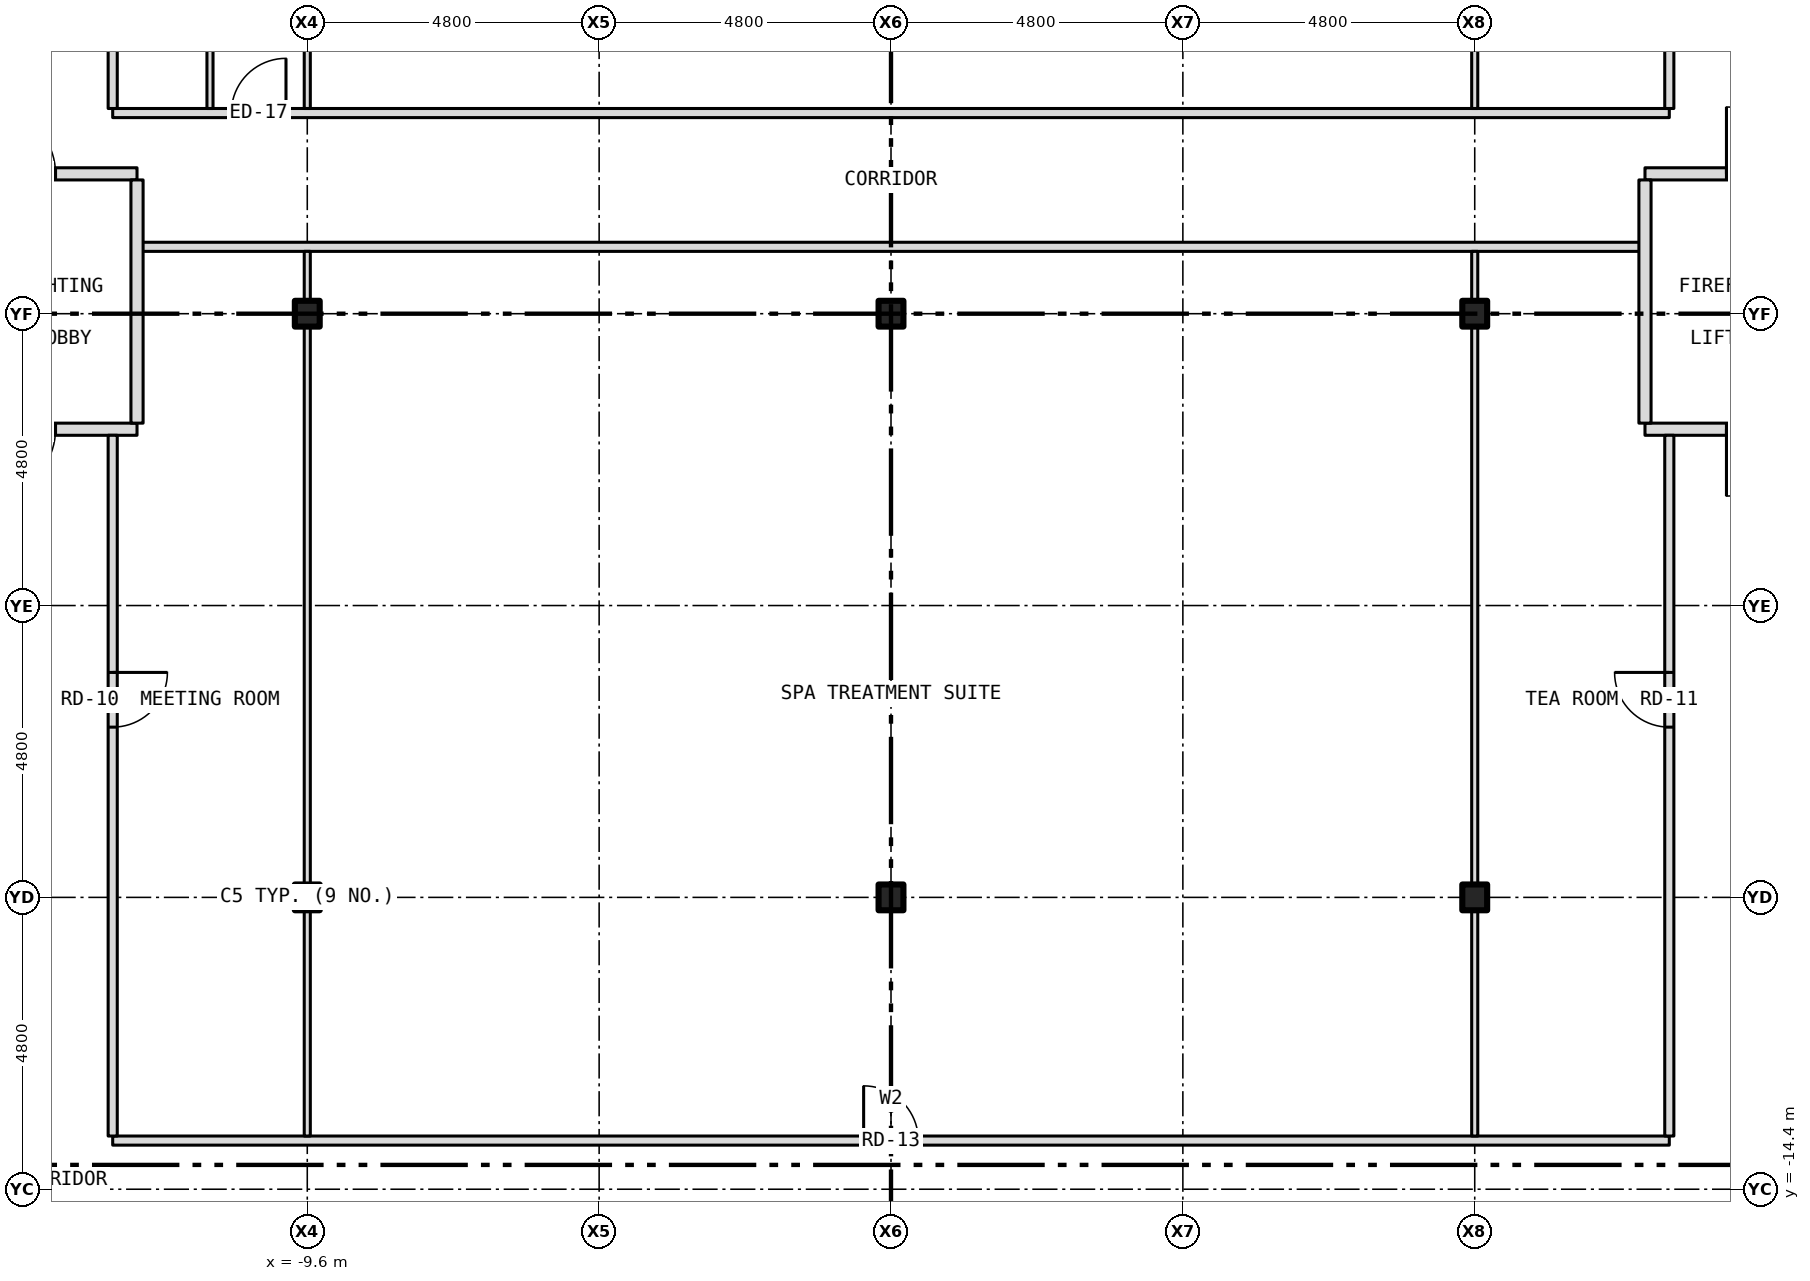
"""IFC4 building model, lengths in metres.
Left out: names, types, materials, properties, quantities, classifications, styles, units other than length and angle.
Written with IfcOpenShell. Run it as: python <this file> out.ifc"""

import sys

from ifc_helpers import new_model, si_unit, direction, frame, frame_2d, origin, origin_2d, place, context, subcontext, project, spatial, rectangle, i_section, extrude, element, fill, save


model = new_model("IFC4")
c1 = context("Model", 3, precision=1e-05, world=origin(), true_north=direction((0.0, 1.0)))
c2 = subcontext(c1, "Body", "Model", "MODEL_VIEW")
j1 = project(units=[si_unit("LENGTHUNIT", "METRE"), si_unit("PLANEANGLEUNIT", "RADIAN")], contexts=[c1])
p1 = place(None, origin())
s1 = spatial("IfcSite", under=j1, at=p1, CompositionType="ELEMENT")
p2 = place(p1, origin())
s2 = spatial("IfcBuilding", under=s1, at=p2, CompositionType="ELEMENT")
p3 = place(p2, frame((0.0, 0.0, 42.5)))
s3 = spatial("IfcBuildingStorey", under=s2, at=p3, CompositionType="ELEMENT", Elevation=42.5)
for number, where, z_axis, x_axis in (
    (1, (-9.6, -9.6, -0.15), (0.0, 0.0, 1.0), (1.0, 0.0, 0.0)),
    (2, (-9.6, 0.0, -0.15), (0.0, 0.0, 1.0), (1.0, 0.0, 0.0)),
    (3, (0.0, -9.6, -0.15), (0.0, 0.0, 1.0), (1.0, 0.0, 0.0)),
    (4, (0.0, 0.0, -0.15), (0.0, 0.0, 1.0), (1.0, 0.0, 0.0)),
    (5, (9.6, -9.6, -0.15), (0.0, 0.0, 1.0), (1.0, 0.0, 0.0)),
    (6, (9.6, 0.0, -0.15), (0.0, 0.0, 1.0), (1.0, 0.0, 0.0)),
):
    element("IfcColumn", number, at=place(p3, frame(where, z_axis=z_axis, x_axis=x_axis)), inside=s3, PredefinedType="COLUMN", context=c2, shape_type="SweptSolid", body=[
        extrude(i_section(OverallWidth=0.409, OverallDepth=0.424, WebThickness=0.033, FlangeThickness=0.052, at=origin_2d()), origin(), (0.0, 0.0, 1.0), 3.5),
    ])
p4 = place(p3, frame((-12.8, -13.6, 0.0), z_axis=(0.0, 0.0, 1.0), x_axis=(1.0, 0.0, 0.0)))
e7 = element("IfcWall", 7, at=p4, inside=s3, PredefinedType="PARTITIONING", context=c2, shape_type="SweptSolid", body=[
    extrude(rectangle(XDim=25.6, YDim=0.15, at=frame_2d((12.8, 0.0))), origin(), (0.0, 0.0, 1.0), 3.35),
])
p5 = place(p4, frame((12.35, 0.0, 0.0)))
e8 = element("IfcOpeningElement", 8, at=p5, cuts=e7, PredefinedType="OPENING", context=c2, shape_type="SweptSolid", body=[
    extrude(rectangle(XDim=0.9, YDim=2.1, at=frame_2d((0.45, 1.05))), frame((0.0, 0.087, 0.0), z_axis=(0.0, -1.0, 0.0), x_axis=(1.0, 0.0, 0.0)), (0.0, 0.0, 1.0), 0.174),
])
p6 = place(p3, frame((-15.68, -1.9, 0.0), z_axis=(0.0, 0.0, 1.0), x_axis=(1.0, 0.0, 0.0)))
e9 = element("IfcWall", 9, at=p6, inside=s3, PredefinedType="PARTITIONING", context=c2, shape_type="SweptSolid", body=[
    extrude(rectangle(XDim=3.28, YDim=0.2, at=frame_2d((1.64, 0.0))), origin(), (0.0, 0.0, 1.0), 3.35),
])
p7 = place(p6, frame((0.84, 0.0, 0.0)))
e10 = element("IfcOpeningElement", 10, at=p7, cuts=e9, PredefinedType="OPENING", context=c2, shape_type="SweptSolid", body=[
    extrude(rectangle(XDim=1.1, YDim=2.1, at=frame_2d((0.55, 1.05))), frame((0.0, 0.112, 0.0), z_axis=(0.0, -1.0, 0.0), x_axis=(1.0, 0.0, 0.0)), (0.0, 0.0, 1.0), 0.224),
])
p8 = place(p3, frame((12.4, -1.9, 0.0), z_axis=(0.0, 0.0, 1.0), x_axis=(1.0, 0.0, 0.0)))
e11 = element("IfcWall", 11, at=p8, inside=s3, PredefinedType="PARTITIONING", context=c2, shape_type="SweptSolid", body=[
    extrude(rectangle(XDim=3.28, YDim=0.2, at=frame_2d((1.64, 0.0))), origin(), (0.0, 0.0, 1.0), 3.35),
])
p9 = place(p8, frame((1.34, 0.0, 0.0)))
e12 = element("IfcOpeningElement", 12, at=p9, cuts=e11, PredefinedType="OPENING", context=c2, shape_type="SweptSolid", body=[
    extrude(rectangle(XDim=1.1, YDim=2.1, at=frame_2d((0.55, 1.05))), frame((0.0, 0.112, 0.0), z_axis=(0.0, -1.0, 0.0), x_axis=(1.0, 0.0, 0.0)), (0.0, 0.0, 1.0), 0.224),
])
p10 = place(p3, frame((-12.4, 1.1, 0.0), z_axis=(0.0, 0.0, 1.0), x_axis=(1.0, 0.0, 0.0)))
e13 = element("IfcWall", 13, at=p10, inside=s3, PredefinedType="PARTITIONING", context=c2, shape_type="SweptSolid", body=[
    extrude(rectangle(XDim=24.8, YDim=0.15, at=frame_2d((12.4, 0.0))), origin(), (0.0, 0.0, 1.0), 3.35),
])
p11 = place(p3, frame((-15.68, 2.3, 0.0), z_axis=(0.0, 0.0, 1.0), x_axis=(1.0, 0.0, 0.0)))
e14 = element("IfcWall", 14, at=p11, inside=s3, PredefinedType="PARTITIONING", context=c2, shape_type="SweptSolid", body=[
    extrude(rectangle(XDim=3.28, YDim=0.2, at=frame_2d((1.64, 0.0))), origin(), (0.0, 0.0, 1.0), 3.35),
])
p12 = place(p11, frame((0.84, 0.0, 0.0)))
e15 = element("IfcOpeningElement", 15, at=p12, cuts=e14, PredefinedType="OPENING", context=c2, shape_type="SweptSolid", body=[
    extrude(rectangle(XDim=1.1, YDim=2.1, at=frame_2d((0.55, 1.05))), frame((0.0, 0.112, 0.0), z_axis=(0.0, -1.0, 0.0), x_axis=(1.0, 0.0, 0.0)), (0.0, 0.0, 1.0), 0.224),
])
p13 = place(p3, frame((12.4, 2.3, 0.0), z_axis=(0.0, 0.0, 1.0), x_axis=(1.0, 0.0, 0.0)))
e16 = element("IfcWall", 16, at=p13, inside=s3, PredefinedType="PARTITIONING", context=c2, shape_type="SweptSolid", body=[
    extrude(rectangle(XDim=3.28, YDim=0.2, at=frame_2d((1.64, 0.0))), origin(), (0.0, 0.0, 1.0), 3.35),
])
p14 = place(p13, frame((1.34, 0.0, 0.0)))
e17 = element("IfcOpeningElement", 17, at=p14, cuts=e16, PredefinedType="OPENING", context=c2, shape_type="SweptSolid", body=[
    extrude(rectangle(XDim=1.1, YDim=2.1, at=frame_2d((0.55, 1.05))), frame((0.0, 0.112, 0.0), z_axis=(0.0, -1.0, 0.0), x_axis=(1.0, 0.0, 0.0)), (0.0, 0.0, 1.0), 0.224),
])
p15 = place(p3, frame((-12.8, 3.3, 0.0), z_axis=(0.0, 0.0, 1.0), x_axis=(1.0, 0.0, 0.0)))
e18 = element("IfcWall", 18, at=p15, inside=s3, PredefinedType="PARTITIONING", context=c2, shape_type="SweptSolid", body=[
    extrude(rectangle(XDim=25.6, YDim=0.15, at=frame_2d((12.8, 0.0))), origin(), (0.0, 0.0, 1.0), 3.35),
])
p16 = place(p15, frame((1.95, 0.0, 0.0)))
e19 = element("IfcOpeningElement", 19, at=p16, cuts=e18, PredefinedType="OPENING", context=c2, shape_type="SweptSolid", body=[
    extrude(rectangle(XDim=0.9, YDim=2.1, at=frame_2d((0.45, 1.05))), frame((0.0, 0.087, 0.0), z_axis=(0.0, -1.0, 0.0), x_axis=(1.0, 0.0, 0.0)), (0.0, 0.0, 1.0), 0.174),
])
p17 = place(p3, frame((-12.8, -13.525, 0.0), z_axis=(0.0, 0.0, 1.0), x_axis=(0.0, 1.0, 0.0)))
e20 = element("IfcWall", 20, at=p17, inside=s3, PredefinedType="PARTITIONING", context=c2, shape_type="SweptSolid", body=[
    extrude(rectangle(XDim=11.525, YDim=0.15, at=frame_2d((5.762, 0.0))), origin(), (0.0, 0.0, 1.0), 3.35),
])
p18 = place(p17, frame((6.725, 0.0, 0.0)))
e21 = element("IfcOpeningElement", 21, at=p18, cuts=e20, PredefinedType="OPENING", context=c2, shape_type="SweptSolid", body=[
    extrude(rectangle(XDim=0.9, YDim=2.1, at=frame_2d((0.45, 1.05))), frame((0.0, 0.087, 0.0), z_axis=(0.0, -1.0, 0.0), x_axis=(1.0, 0.0, 0.0)), (0.0, 0.0, 1.0), 0.174),
])
p19 = place(p3, frame((-12.8, 3.375, 0.0), z_axis=(0.0, 0.0, 1.0), x_axis=(0.0, 1.0, 0.0)))
e22 = element("IfcWall", 22, at=p19, inside=s3, PredefinedType="PARTITIONING", context=c2, shape_type="SweptSolid", body=[
    extrude(rectangle(XDim=7.275, YDim=0.15, at=frame_2d((3.637, 0.0))), origin(), (0.0, 0.0, 1.0), 3.35),
])
p20 = place(p19, frame((3.175, 0.0, 0.0)))
e23 = element("IfcOpeningElement", 23, at=p20, cuts=e22, PredefinedType="OPENING", context=c2, shape_type="SweptSolid", body=[
    extrude(rectangle(XDim=0.9, YDim=2.1, at=frame_2d((0.45, 1.05))), frame((0.0, 0.087, 0.0), z_axis=(0.0, -1.0, 0.0), x_axis=(1.0, 0.0, 0.0)), (0.0, 0.0, 1.0), 0.174),
])
p21 = place(p3, frame((-12.4, -1.8, 0.0), z_axis=(0.0, 0.0, 1.0), x_axis=(0.0, 1.0, 0.0)))
e24 = element("IfcWall", 24, at=p21, inside=s3, PredefinedType="PARTITIONING", context=c2, shape_type="SweptSolid", body=[
    extrude(rectangle(XDim=4.0, YDim=0.2, at=frame_2d((2.0, 0.0))), origin(), (0.0, 0.0, 1.0), 3.35),
])
p22 = place(p3, frame((-11.2, 3.375, 0.0), z_axis=(0.0, 0.0, 1.0), x_axis=(0.0, 1.0, 0.0)))
e25 = element("IfcWall", 25, at=p22, inside=s3, PredefinedType="PARTITIONING", context=c2, shape_type="SweptSolid", body=[
    extrude(rectangle(XDim=10.15, YDim=0.1, at=frame_2d((5.075, 0.0))), origin(), (0.0, 0.0, 1.0), 3.35),
])
p23 = place(p3, frame((-9.6, -13.525, 0.0), z_axis=(0.0, 0.0, 1.0), x_axis=(0.0, 1.0, 0.0)))
e26 = element("IfcWall", 26, at=p23, inside=s3, PredefinedType="PARTITIONING", context=c2, shape_type="SweptSolid", body=[
    extrude(rectangle(XDim=3.721, YDim=0.1, at=frame_2d((1.86, 0.0))), origin(), (0.0, 0.0, 1.0), 2.728),
])
p24 = place(p3, frame((-9.6, -9.804, 0.0), z_axis=(0.0, 0.0, 1.0), x_axis=(0.0, 1.0, 0.0)))
e27 = element("IfcWall", 27, at=p24, inside=s3, PredefinedType="PARTITIONING", context=c2, shape_type="SweptSolid", body=[
    extrude(rectangle(XDim=0.408, YDim=0.1, at=frame_2d((0.204, 0.0))), origin(), (0.0, 0.0, 1.0), 3.35),
])
p25 = place(p3, frame((-9.6, -9.396, 0.0), z_axis=(0.0, 0.0, 1.0), x_axis=(0.0, 1.0, 0.0)))
e28 = element("IfcWall", 28, at=p25, inside=s3, PredefinedType="PARTITIONING", context=c2, shape_type="SweptSolid", body=[
    extrude(rectangle(XDim=9.192, YDim=0.1, at=frame_2d((4.596, 0.0))), origin(), (0.0, 0.0, 1.0), 2.728),
])
p26 = place(p3, frame((-9.6, -0.204, 0.0), z_axis=(0.0, 0.0, 1.0), x_axis=(0.0, 1.0, 0.0)))
e29 = element("IfcWall", 29, at=p26, inside=s3, PredefinedType="PARTITIONING", context=c2, shape_type="SweptSolid", body=[
    extrude(rectangle(XDim=0.408, YDim=0.1, at=frame_2d((0.204, 0.0))), origin(), (0.0, 0.0, 1.0), 3.35),
])
p27 = place(p3, frame((-9.6, 0.204, 0.0), z_axis=(0.0, 0.0, 1.0), x_axis=(0.0, 1.0, 0.0)))
e30 = element("IfcWall", 30, at=p27, inside=s3, PredefinedType="PARTITIONING", context=c2, shape_type="SweptSolid", body=[
    extrude(rectangle(XDim=0.821, YDim=0.1, at=frame_2d((0.41, 0.0))), origin(), (0.0, 0.0, 1.0), 2.728),
])
p28 = place(p3, frame((-9.6, 3.375, 0.0), z_axis=(0.0, 0.0, 1.0), x_axis=(0.0, 1.0, 0.0)))
e31 = element("IfcWall", 31, at=p28, inside=s3, PredefinedType="PARTITIONING", context=c2, shape_type="SweptSolid", body=[
    extrude(rectangle(XDim=6.021, YDim=0.1, at=frame_2d((3.01, 0.0))), origin(), (0.0, 0.0, 1.0), 2.728),
])
p29 = place(p3, frame((9.6, -13.525, 0.0), z_axis=(0.0, 0.0, 1.0), x_axis=(0.0, 1.0, 0.0)))
e32 = element("IfcWall", 32, at=p29, inside=s3, PredefinedType="PARTITIONING", context=c2, shape_type="SweptSolid", body=[
    extrude(rectangle(XDim=3.721, YDim=0.1, at=frame_2d((1.86, 0.0))), origin(), (0.0, 0.0, 1.0), 2.728),
])
p30 = place(p3, frame((9.6, -9.804, 0.0), z_axis=(0.0, 0.0, 1.0), x_axis=(0.0, 1.0, 0.0)))
e33 = element("IfcWall", 33, at=p30, inside=s3, PredefinedType="PARTITIONING", context=c2, shape_type="SweptSolid", body=[
    extrude(rectangle(XDim=0.408, YDim=0.1, at=frame_2d((0.204, 0.0))), origin(), (0.0, 0.0, 1.0), 3.35),
])
p31 = place(p3, frame((9.6, -9.396, 0.0), z_axis=(0.0, 0.0, 1.0), x_axis=(0.0, 1.0, 0.0)))
e34 = element("IfcWall", 34, at=p31, inside=s3, PredefinedType="PARTITIONING", context=c2, shape_type="SweptSolid", body=[
    extrude(rectangle(XDim=9.192, YDim=0.1, at=frame_2d((4.596, 0.0))), origin(), (0.0, 0.0, 1.0), 2.728),
])
p32 = place(p3, frame((9.6, -0.204, 0.0), z_axis=(0.0, 0.0, 1.0), x_axis=(0.0, 1.0, 0.0)))
e35 = element("IfcWall", 35, at=p32, inside=s3, PredefinedType="PARTITIONING", context=c2, shape_type="SweptSolid", body=[
    extrude(rectangle(XDim=0.408, YDim=0.1, at=frame_2d((0.204, 0.0))), origin(), (0.0, 0.0, 1.0), 3.35),
])
p33 = place(p3, frame((9.6, 0.204, 0.0), z_axis=(0.0, 0.0, 1.0), x_axis=(0.0, 1.0, 0.0)))
e36 = element("IfcWall", 36, at=p33, inside=s3, PredefinedType="PARTITIONING", context=c2, shape_type="SweptSolid", body=[
    extrude(rectangle(XDim=0.821, YDim=0.1, at=frame_2d((0.41, 0.0))), origin(), (0.0, 0.0, 1.0), 2.728),
])
p34 = place(p3, frame((9.6, 3.375, 0.0), z_axis=(0.0, 0.0, 1.0), x_axis=(0.0, 1.0, 0.0)))
e37 = element("IfcWall", 37, at=p34, inside=s3, PredefinedType="PARTITIONING", context=c2, shape_type="SweptSolid", body=[
    extrude(rectangle(XDim=6.021, YDim=0.1, at=frame_2d((3.01, 0.0))), origin(), (0.0, 0.0, 1.0), 2.728),
])
p35 = place(p3, frame((12.4, -1.8, 0.0), z_axis=(0.0, 0.0, 1.0), x_axis=(0.0, 1.0, 0.0)))
e38 = element("IfcWall", 38, at=p35, inside=s3, PredefinedType="PARTITIONING", context=c2, shape_type="SweptSolid", body=[
    extrude(rectangle(XDim=4.0, YDim=0.2, at=frame_2d((2.0, 0.0))), origin(), (0.0, 0.0, 1.0), 3.35),
])
p36 = place(p3, frame((12.8, -13.525, 0.0), z_axis=(0.0, 0.0, 1.0), x_axis=(0.0, 1.0, 0.0)))
e39 = element("IfcWall", 39, at=p36, inside=s3, PredefinedType="PARTITIONING", context=c2, shape_type="SweptSolid", body=[
    extrude(rectangle(XDim=11.525, YDim=0.15, at=frame_2d((5.762, 0.0))), origin(), (0.0, 0.0, 1.0), 3.35),
])
p37 = place(p36, frame((6.725, 0.0, 0.0)))
e40 = element("IfcOpeningElement", 40, at=p37, cuts=e39, PredefinedType="OPENING", context=c2, shape_type="SweptSolid", body=[
    extrude(rectangle(XDim=0.9, YDim=2.1, at=frame_2d((0.45, 1.05))), frame((0.0, 0.087, 0.0), z_axis=(0.0, -1.0, 0.0), x_axis=(1.0, 0.0, 0.0)), (0.0, 0.0, 1.0), 0.174),
])
p38 = place(p3, frame((12.8, 3.375, 0.0), z_axis=(0.0, 0.0, 1.0), x_axis=(0.0, 1.0, 0.0)))
e41 = element("IfcWall", 41, at=p38, inside=s3, PredefinedType="PARTITIONING", context=c2, shape_type="SweptSolid", body=[
    extrude(rectangle(XDim=7.275, YDim=0.15, at=frame_2d((3.637, 0.0))), origin(), (0.0, 0.0, 1.0), 3.35),
])
p39 = place(p38, frame((3.175, 0.0, 0.0)))
e42 = element("IfcOpeningElement", 42, at=p39, cuts=e41, PredefinedType="OPENING", context=c2, shape_type="SweptSolid", body=[
    extrude(rectangle(XDim=0.9, YDim=2.1, at=frame_2d((0.45, 1.05))), frame((0.0, 0.087, 0.0), z_axis=(0.0, -1.0, 0.0), x_axis=(1.0, 0.0, 0.0)), (0.0, 0.0, 1.0), 0.174),
])
p40 = place(p12, origin())
e43 = element("IfcDoor", 43, at=p40, inside=s3, OperationType="SINGLE_SWING_LEFT", PredefinedType="DOOR", context=c2, shape_type="SweptSolid", body=[
    extrude(rectangle(XDim=1.1, YDim=2.1, at=frame_2d((0.55, 1.05))), frame((0.0, 0.025, 0.0), z_axis=(0.0, -1.0, 0.0), x_axis=(1.0, 0.0, 0.0)), (0.0, 0.0, 1.0), 0.05),
])
fill(e15, e43)
p41 = place(p7, origin())
e44 = element("IfcDoor", 44, at=p41, inside=s3, OperationType="SINGLE_SWING_LEFT", PredefinedType="DOOR", context=c2, shape_type="SweptSolid", body=[
    extrude(rectangle(XDim=1.1, YDim=2.1, at=frame_2d((0.55, 1.05))), frame((0.0, 0.025, 0.0), z_axis=(0.0, -1.0, 0.0), x_axis=(1.0, 0.0, 0.0)), (0.0, 0.0, 1.0), 0.05),
])
fill(e10, e44)
p42 = place(p14, origin())
e45 = element("IfcDoor", 45, at=p42, inside=s3, OperationType="SINGLE_SWING_LEFT", PredefinedType="DOOR", context=c2, shape_type="SweptSolid", body=[
    extrude(rectangle(XDim=1.1, YDim=2.1, at=frame_2d((0.55, 1.05))), frame((0.0, 0.025, 0.0), z_axis=(0.0, -1.0, 0.0), x_axis=(1.0, 0.0, 0.0)), (0.0, 0.0, 1.0), 0.05),
])
fill(e17, e45)
p43 = place(p9, origin())
e46 = element("IfcDoor", 46, at=p43, inside=s3, OperationType="SINGLE_SWING_LEFT", PredefinedType="DOOR", context=c2, shape_type="SweptSolid", body=[
    extrude(rectangle(XDim=1.1, YDim=2.1, at=frame_2d((0.55, 1.05))), frame((0.0, 0.025, 0.0), z_axis=(0.0, -1.0, 0.0), x_axis=(1.0, 0.0, 0.0)), (0.0, 0.0, 1.0), 0.05),
])
fill(e12, e46)
p44 = place(p16, origin())
e47 = element("IfcDoor", 47, at=p44, inside=s3, OperationType="SINGLE_SWING_RIGHT", PredefinedType="DOOR", context=c2, shape_type="SweptSolid", body=[
    extrude(rectangle(XDim=0.9, YDim=2.1, at=frame_2d((0.45, 1.05))), frame((0.0, 0.025, 0.0), z_axis=(0.0, -1.0, 0.0), x_axis=(1.0, 0.0, 0.0)), (0.0, 0.0, 1.0), 0.05),
])
fill(e19, e47)
p45 = place(p18, origin())
e48 = element("IfcDoor", 48, at=p45, inside=s3, OperationType="SINGLE_SWING_RIGHT", PredefinedType="DOOR", context=c2, shape_type="SweptSolid", body=[
    extrude(rectangle(XDim=0.9, YDim=2.1, at=frame_2d((0.45, 1.05))), frame((0.0, 0.025, 0.0), z_axis=(0.0, -1.0, 0.0), x_axis=(1.0, 0.0, 0.0)), (0.0, 0.0, 1.0), 0.05),
])
fill(e21, e48)
p46 = place(p37, origin())
e49 = element("IfcDoor", 49, at=p46, inside=s3, OperationType="SINGLE_SWING_RIGHT", PredefinedType="DOOR", context=c2, shape_type="SweptSolid", body=[
    extrude(rectangle(XDim=0.9, YDim=2.1, at=frame_2d((0.45, 1.05))), frame((0.0, 0.025, 0.0), z_axis=(0.0, -1.0, 0.0), x_axis=(1.0, 0.0, 0.0)), (0.0, 0.0, 1.0), 0.05),
])
fill(e40, e49)
p47 = place(p5, origin())
e50 = element("IfcDoor", 50, at=p47, inside=s3, OperationType="SINGLE_SWING_LEFT", PredefinedType="DOOR", context=c2, shape_type="SweptSolid", body=[
    extrude(rectangle(XDim=0.9, YDim=2.1, at=frame_2d((0.45, 1.05))), frame((0.0, 0.025, 0.0), z_axis=(0.0, -1.0, 0.0), x_axis=(1.0, 0.0, 0.0)), (0.0, 0.0, 1.0), 0.05),
])
fill(e8, e50)
save(model, sys.argv[1])
